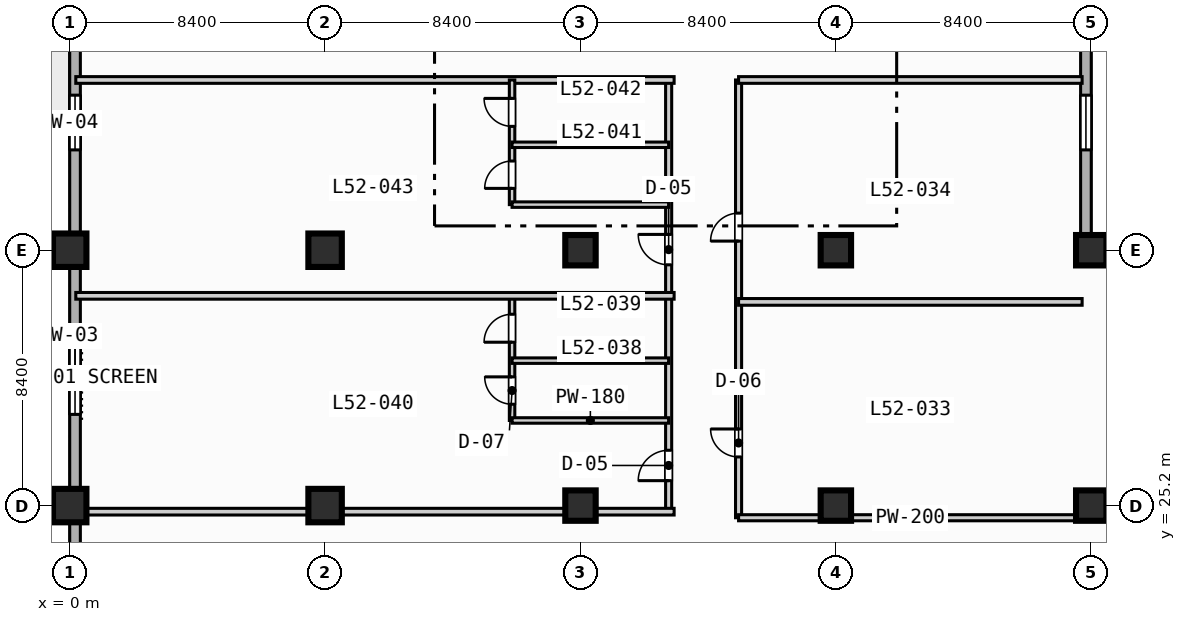
"""IFC4 building model, lengths in metres.
Left out: names, types, materials, properties, quantities, classifications, styles, units other than length and angle.
Written with IfcOpenShell. Run it as: python <this file> out.ifc"""

import sys

from ifc_helpers import new_model, si_unit, direction, frame, frame_2d, origin, origin_2d, place, context, subcontext, project, spatial, rectangle, extrude, element, fill, save


model = new_model("IFC4")
c1 = context("Model", 3, precision=1e-05, world=origin(), true_north=direction((0.0, 1.0)))
c2 = subcontext(c1, "Body", "Model", "MODEL_VIEW")
j1 = project(units=[si_unit("LENGTHUNIT", "METRE"), si_unit("PLANEANGLEUNIT", "RADIAN")], contexts=[c1])
p1 = place(None, origin())
s1 = spatial("IfcSite", under=j1, at=p1, CompositionType="ELEMENT")
p2 = place(p1, origin())
s2 = spatial("IfcBuilding", under=s1, at=p2, CompositionType="ELEMENT")
p3 = place(p2, frame((0.0, 0.0, 212.4)))
s3 = spatial("IfcBuildingStorey", under=s2, at=p3, CompositionType="ELEMENT", Elevation=212.4)
for number, where, z_axis, x_axis in (
    (1, (0.0, 25.2, 0.0), (0.0, 0.0, 1.0), (1.0, 0.0, 0.0)),
    (2, (0.0, 33.6, 0.0), (0.0, 0.0, 1.0), (1.0, 0.0, 0.0)),
    (3, (8.4, 25.2, 0.0), (0.0, 0.0, 1.0), (1.0, 0.0, 0.0)),
    (4, (8.4, 33.6, 0.0), (0.0, 0.0, 1.0), (1.0, 0.0, 0.0)),
):
    element("IfcColumn", number, at=place(p3, frame(where, z_axis=z_axis, x_axis=x_axis)), inside=s3, PredefinedType="COLUMN", context=c2, shape_type="SweptSolid", body=[
        extrude(rectangle(XDim=1.1, YDim=1.1, at=origin_2d()), origin(), (0.0, 0.0, 1.0), 3.7),
    ])
for number, where, z_axis, x_axis in (
    (5, (16.8, 25.2, 0.0), (0.0, 0.0, 1.0), (1.0, 0.0, 0.0)),
    (6, (16.8, 33.6, 0.0), (0.0, 0.0, 1.0), (1.0, 0.0, 0.0)),
    (7, (25.2, 25.2, 0.0), (0.0, 0.0, 1.0), (1.0, 0.0, 0.0)),
    (8, (25.2, 33.6, 0.0), (0.0, 0.0, 1.0), (1.0, 0.0, 0.0)),
    (9, (33.6, 25.2, 0.0), (0.0, 0.0, 1.0), (1.0, 0.0, 0.0)),
    (10, (33.6, 33.6, 0.0), (0.0, 0.0, 1.0), (1.0, 0.0, 0.0)),
):
    element("IfcColumn", number, at=place(p3, frame(where, z_axis=z_axis, x_axis=x_axis)), inside=s3, PredefinedType="COLUMN", context=c2, shape_type="SweptSolid", body=[
        extrude(rectangle(XDim=1.0, YDim=1.0, at=origin_2d()), origin(), (0.0, 0.0, 1.0), 3.7),
    ])
p4 = place(p3, frame((0.175, 3.175, 0.0), z_axis=(0.0, 0.0, 1.0), x_axis=(0.0, 1.0, 0.0)))
e11 = element("IfcWall", 11, at=p4, inside=s3, PredefinedType="STANDARD", context=c2, shape_type="SweptSolid", body=[
    extrude(rectangle(XDim=69.25, YDim=0.35, at=frame_2d((34.625, 0.0))), origin(), (0.0, 0.0, 1.0), 3.47),
])
p5 = place(p4, frame((42.325, 0.0, 0.0)))
e12 = element("IfcOpeningElement", 12, at=p5, cuts=e11, PredefinedType="OPENING", context=c2, shape_type="SweptSolid", body=[
    extrude(rectangle(XDim=1.4, YDim=2.2, at=frame_2d((0.7, 1.1))), frame((0.0, 0.185, 0.0), z_axis=(0.0, -1.0, 0.0), x_axis=(1.0, 0.0, 0.0)), (0.0, 0.0, 1.0), 0.37),
])
p6 = place(p4, frame((25.025, 0.0, 0.85)))
e13 = element("IfcOpeningElement", 13, at=p6, cuts=e11, PredefinedType="OPENING", context=c2, shape_type="SweptSolid", body=[
    extrude(rectangle(XDim=2.4, YDim=1.95, at=frame_2d((1.2, 0.975))), frame((0.0, 0.185, 0.0), z_axis=(0.0, -1.0, 0.0), x_axis=(1.0, 0.0, 0.0)), (0.0, 0.0, 1.0), 0.37),
])
p7 = place(p4, frame((33.725, 0.0, 0.85)))
e14 = element("IfcOpeningElement", 14, at=p7, cuts=e11, PredefinedType="OPENING", context=c2, shape_type="SweptSolid", body=[
    extrude(rectangle(XDim=1.8, YDim=1.8, at=frame_2d((0.9, 0.9))), frame((0.0, 0.185, 0.0), z_axis=(0.0, -1.0, 0.0), x_axis=(1.0, 0.0, 0.0)), (0.0, 0.0, 1.0), 0.37),
])
p8 = place(p4, frame((58.375, 0.0, 0.85)))
e15 = element("IfcOpeningElement", 15, at=p8, cuts=e11, PredefinedType="OPENING", context=c2, shape_type="SweptSolid", body=[
    extrude(rectangle(XDim=1.8, YDim=1.8, at=frame_2d((0.9, 0.9))), frame((0.0, 0.185, 0.0), z_axis=(0.0, -1.0, 0.0), x_axis=(1.0, 0.0, 0.0)), (0.0, 0.0, 1.0), 0.37),
])
p9 = place(p4, frame((64.775, 0.0, 0.85)))
e16 = element("IfcOpeningElement", 16, at=p9, cuts=e11, PredefinedType="OPENING", context=c2, shape_type="SweptSolid", body=[
    extrude(rectangle(XDim=1.8, YDim=1.8, at=frame_2d((0.9, 0.9))), frame((0.0, 0.185, 0.0), z_axis=(0.0, -1.0, 0.0), x_axis=(1.0, 0.0, 0.0)), (0.0, 0.0, 1.0), 0.37),
])
p10 = place(p3, frame((33.425, 72.425, 0.0), z_axis=(0.0, 0.0, 1.0), x_axis=(0.0, -1.0, 0.0)))
e17 = element("IfcWall", 17, at=p10, inside=s3, PredefinedType="STANDARD", context=c2, shape_type="SweptSolid", body=[
    extrude(rectangle(XDim=39.0, YDim=0.35, at=frame_2d((19.5, 0.0))), origin(), (0.0, 0.0, 1.0), 3.47),
])
p11 = place(p10, frame((33.725, 0.0, 0.85)))
e18 = element("IfcOpeningElement", 18, at=p11, cuts=e17, PredefinedType="OPENING", context=c2, shape_type="SweptSolid", body=[
    extrude(rectangle(XDim=1.8, YDim=1.8, at=frame_2d((0.9, 0.9))), frame((0.0, 0.185, 0.0), z_axis=(0.0, -1.0, 0.0), x_axis=(1.0, 0.0, 0.0)), (0.0, 0.0, 1.0), 0.37),
])
p12 = place(p10, frame((16.925, 0.0, 0.85)))
e19 = element("IfcOpeningElement", 19, at=p12, cuts=e17, PredefinedType="OPENING", context=c2, shape_type="SweptSolid", body=[
    extrude(rectangle(XDim=1.8, YDim=1.8, at=frame_2d((0.9, 0.9))), frame((0.0, 0.185, 0.0), z_axis=(0.0, -1.0, 0.0), x_axis=(1.0, 0.0, 0.0)), (0.0, 0.0, 1.0), 0.37),
])
p13 = place(p10, frame((8.225, 0.0, 0.85)))
e20 = element("IfcOpeningElement", 20, at=p13, cuts=e17, PredefinedType="OPENING", context=c2, shape_type="SweptSolid", body=[
    extrude(rectangle(XDim=2.4, YDim=1.95, at=frame_2d((1.2, 0.975))), frame((0.0, 0.185, 0.0), z_axis=(0.0, -1.0, 0.0), x_axis=(1.0, 0.0, 0.0)), (0.0, 0.0, 1.0), 0.37),
])
p14 = place(p3, frame((33.425, 33.425, 0.0), z_axis=(0.0, 0.0, 1.0), x_axis=(1.0, 0.0, 0.0)))
e21 = element("IfcWall", 21, at=p14, inside=s3, PredefinedType="STANDARD", context=c2, shape_type="SweptSolid", body=[
    extrude(rectangle(XDim=39.0, YDim=0.35, at=frame_2d((19.5, 0.0))), origin(), (0.0, 0.0, 1.0), 3.47),
])
p15 = place(p14, frame((12.075, 0.0, 0.0)))
e22 = element("IfcOpeningElement", 22, at=p15, cuts=e21, PredefinedType="OPENING", context=c2, shape_type="SweptSolid", body=[
    extrude(rectangle(XDim=1.4, YDim=2.2, at=frame_2d((0.7, 1.1))), frame((0.0, 0.185, 0.0), z_axis=(0.0, -1.0, 0.0), x_axis=(1.0, 0.0, 0.0)), (0.0, 0.0, 1.0), 0.37),
])
p16 = place(p14, frame((20.275, 0.0, 0.85)))
e23 = element("IfcOpeningElement", 23, at=p16, cuts=e21, PredefinedType="OPENING", context=c2, shape_type="SweptSolid", body=[
    extrude(rectangle(XDim=1.8, YDim=1.8, at=frame_2d((0.9, 0.9))), frame((0.0, 0.185, 0.0), z_axis=(0.0, -1.0, 0.0), x_axis=(1.0, 0.0, 0.0)), (0.0, 0.0, 1.0), 0.37),
])
p17 = place(p14, frame((28.375, 0.0, 0.85)))
e24 = element("IfcOpeningElement", 24, at=p17, cuts=e21, PredefinedType="OPENING", context=c2, shape_type="SweptSolid", body=[
    extrude(rectangle(XDim=2.4, YDim=1.95, at=frame_2d((1.2, 0.975))), frame((0.0, 0.185, 0.0), z_axis=(0.0, -1.0, 0.0), x_axis=(1.0, 0.0, 0.0)), (0.0, 0.0, 1.0), 0.37),
])
p18 = place(p3, frame((22.0, 24.8, 0.0), z_axis=(0.0, 0.0, 1.0), x_axis=(0.0, 1.0, 0.0)))
e25 = element("IfcWall", 25, at=p18, inside=s3, PredefinedType="PARTITIONING", context=c2, shape_type="SweptSolid", body=[
    extrude(rectangle(XDim=14.4, YDim=0.2, at=frame_2d((7.2, 0.0))), origin(), (0.0, 0.0, 1.0), 3.47),
])
p19 = place(p18, frame((2.0, 0.0, 0.0)))
e26 = element("IfcOpeningElement", 26, at=p19, cuts=e25, PredefinedType="OPENING", context=c2, shape_type="SweptSolid", body=[
    extrude(rectangle(XDim=0.92, YDim=2.1, at=frame_2d((0.46, 1.05))), frame((0.0, 0.11, 0.0), z_axis=(0.0, -1.0, 0.0), x_axis=(1.0, 0.0, 0.0)), (0.0, 0.0, 1.0), 0.22),
])
p20 = place(p18, frame((9.1, 0.0, 0.0)))
e27 = element("IfcOpeningElement", 27, at=p20, cuts=e25, PredefinedType="OPENING", context=c2, shape_type="SweptSolid", body=[
    extrude(rectangle(XDim=0.92, YDim=2.1, at=frame_2d((0.46, 1.05))), frame((0.0, 0.11, 0.0), z_axis=(0.0, -1.0, 0.0), x_axis=(1.0, 0.0, 0.0)), (0.0, 0.0, 1.0), 0.22),
])
p21 = place(p3, frame((22.0, 24.8, 0.0), z_axis=(0.0, 0.0, 1.0), x_axis=(1.0, 0.0, 0.0)))
e28 = element("IfcWall", 28, at=p21, inside=s3, PredefinedType="PARTITIONING", context=c2, shape_type="SweptSolid", body=[
    extrude(rectangle(XDim=11.3, YDim=0.2, at=frame_2d((5.65, 0.0))), origin(), (0.0, 0.0, 1.0), 3.47),
])
for number, where, z_axis, x_axis in (
    (29, (22.0, 31.9, 0.0), (0.0, 0.0, 1.0), (1.0, 0.0, 0.0)),
    (30, (22.0, 39.2, 0.0), (0.0, 0.0, 1.0), (1.0, 0.0, 0.0)),
):
    element("IfcWall", number, at=place(p3, frame(where, z_axis=z_axis, x_axis=x_axis)), inside=s3, PredefinedType="PARTITIONING", context=c2, shape_type="SweptSolid", body=[
        extrude(rectangle(XDim=11.3, YDim=0.22, at=frame_2d((5.65, 0.0))), origin(), (0.0, 0.0, 1.0), 3.47),
    ])
p22 = place(p3, frame((19.7, 25.0, 0.0), z_axis=(0.0, 0.0, 1.0), x_axis=(0.0, 1.0, 0.0)))
e31 = element("IfcWall", 31, at=p22, inside=s3, PredefinedType="PARTITIONING", context=c2, shape_type="SweptSolid", body=[
    extrude(rectangle(XDim=14.2, YDim=0.2, at=frame_2d((7.1, 0.0))), origin(), (0.0, 0.0, 1.0), 3.47),
])
p23 = place(p22, frame((1.02, 0.0, 0.0)))
e32 = element("IfcOpeningElement", 32, at=p23, cuts=e31, PredefinedType="OPENING", context=c2, shape_type="SweptSolid", body=[
    extrude(rectangle(XDim=1.0, YDim=2.15, at=frame_2d((0.5, 1.075))), frame((0.0, 0.11, 0.0), z_axis=(0.0, -1.0, 0.0), x_axis=(1.0, 0.0, 0.0)), (0.0, 0.0, 1.0), 0.22),
])
p24 = place(p22, frame((8.12, 0.0, 0.0)))
e33 = element("IfcOpeningElement", 33, at=p24, cuts=e31, PredefinedType="OPENING", context=c2, shape_type="SweptSolid", body=[
    extrude(rectangle(XDim=1.0, YDim=2.15, at=frame_2d((0.5, 1.075))), frame((0.0, 0.11, 0.0), z_axis=(0.0, -1.0, 0.0), x_axis=(1.0, 0.0, 0.0)), (0.0, 0.0, 1.0), 0.22),
])
p25 = place(p3, frame((0.2, 25.0, 0.0), z_axis=(0.0, 0.0, 1.0), x_axis=(1.0, 0.0, 0.0)))
e34 = element("IfcWall", 34, at=p25, inside=s3, PredefinedType="PARTITIONING", context=c2, shape_type="SweptSolid", body=[
    extrude(rectangle(XDim=19.68, YDim=0.22, at=frame_2d((9.84, 0.0))), origin(), (0.0, 0.0, 1.0), 2.82),
])
p26 = place(p3, frame((14.55, 28.0, 0.0), z_axis=(0.0, 0.0, 1.0), x_axis=(0.0, 1.0, 0.0)))
e35 = element("IfcWall", 35, at=p26, inside=s3, PredefinedType="PLUMBINGWALL", context=c2, shape_type="SweptSolid", body=[
    extrude(rectangle(XDim=4.1, YDim=0.18, at=frame_2d((2.05, 0.0))), origin(), (0.0, 0.0, 1.0), 3.47),
])
p27 = place(p26, frame((0.534, 0.0, 0.0)))
e36 = element("IfcOpeningElement", 36, at=p27, cuts=e35, PredefinedType="OPENING", context=c2, shape_type="SweptSolid", body=[
    extrude(rectangle(XDim=0.9, YDim=2.1, at=frame_2d((0.45, 1.05))), frame((0.0, 0.1, 0.0), z_axis=(0.0, -1.0, 0.0), x_axis=(1.0, 0.0, 0.0)), (0.0, 0.0, 1.0), 0.2),
])
p28 = place(p26, frame((2.574, 0.0, 0.0)))
e37 = element("IfcOpeningElement", 37, at=p28, cuts=e35, PredefinedType="OPENING", context=c2, shape_type="SweptSolid", body=[
    extrude(rectangle(XDim=0.92, YDim=2.1, at=frame_2d((0.46, 1.05))), frame((0.0, 0.1, 0.0), z_axis=(0.0, -1.0, 0.0), x_axis=(1.0, 0.0, 0.0)), (0.0, 0.0, 1.0), 0.2),
])
for number, where, z_axis, x_axis in (
    (38, (14.55, 28.0, 0.0), (0.0, 0.0, 1.0), (1.0, 0.0, 0.0)),
    (39, (14.55, 29.968, 0.0), (0.0, 0.0, 1.0), (1.0, 0.0, 0.0)),
):
    element("IfcWall", number, at=place(p3, frame(where, z_axis=z_axis, x_axis=x_axis)), inside=s3, PredefinedType="PLUMBINGWALL", context=c2, shape_type="SweptSolid", body=[
        extrude(rectangle(XDim=5.15, YDim=0.18, at=frame_2d((2.575, 0.0))), origin(), (0.0, 0.0, 1.0), 3.47),
    ])
for number, where, z_axis, x_axis in (
    (40, (0.2, 32.1, 0.0), (0.0, 0.0, 1.0), (1.0, 0.0, 0.0)),
    (41, (0.2, 39.2, 0.0), (0.0, 0.0, 1.0), (1.0, 0.0, 0.0)),
):
    element("IfcWall", number, at=place(p3, frame(where, z_axis=z_axis, x_axis=x_axis)), inside=s3, PredefinedType="PARTITIONING", context=c2, shape_type="SweptSolid", body=[
        extrude(rectangle(XDim=19.68, YDim=0.22, at=frame_2d((9.84, 0.0))), origin(), (0.0, 0.0, 1.0), 3.47),
    ])
p29 = place(p3, frame((14.55, 35.1, 0.0), z_axis=(0.0, 0.0, 1.0), x_axis=(0.0, 1.0, 0.0)))
e42 = element("IfcWall", 42, at=p29, inside=s3, PredefinedType="PLUMBINGWALL", context=c2, shape_type="SweptSolid", body=[
    extrude(rectangle(XDim=4.1, YDim=0.18, at=frame_2d((2.05, 0.0))), origin(), (0.0, 0.0, 1.0), 3.47),
])
p30 = place(p29, frame((0.534, 0.0, 0.0)))
e43 = element("IfcOpeningElement", 43, at=p30, cuts=e42, PredefinedType="OPENING", context=c2, shape_type="SweptSolid", body=[
    extrude(rectangle(XDim=0.9, YDim=2.1, at=frame_2d((0.45, 1.05))), frame((0.0, 0.1, 0.0), z_axis=(0.0, -1.0, 0.0), x_axis=(1.0, 0.0, 0.0)), (0.0, 0.0, 1.0), 0.2),
])
p31 = place(p29, frame((2.574, 0.0, 0.0)))
e44 = element("IfcOpeningElement", 44, at=p31, cuts=e42, PredefinedType="OPENING", context=c2, shape_type="SweptSolid", body=[
    extrude(rectangle(XDim=0.92, YDim=2.1, at=frame_2d((0.46, 1.05))), frame((0.0, 0.1, 0.0), z_axis=(0.0, -1.0, 0.0), x_axis=(1.0, 0.0, 0.0)), (0.0, 0.0, 1.0), 0.2),
])
for number, where, z_axis, x_axis in (
    (45, (14.55, 35.1, 0.0), (0.0, 0.0, 1.0), (1.0, 0.0, 0.0)),
    (46, (14.55, 37.068, 0.0), (0.0, 0.0, 1.0), (1.0, 0.0, 0.0)),
):
    element("IfcWall", number, at=place(p3, frame(where, z_axis=z_axis, x_axis=x_axis)), inside=s3, PredefinedType="PLUMBINGWALL", context=c2, shape_type="SweptSolid", body=[
        extrude(rectangle(XDim=5.15, YDim=0.18, at=frame_2d((2.575, 0.0))), origin(), (0.0, 0.0, 1.0), 3.47),
    ])
p32 = place(p6, origin())
e47 = element("IfcWindow", 47, at=p32, inside=s3, PartitioningType="SINGLE_PANEL", PredefinedType="WINDOW", context=c2, shape_type="SweptSolid", body=[
    extrude(rectangle(XDim=2.4, YDim=1.95, at=frame_2d((1.2, 0.975))), frame((0.0, 0.03, 0.0), z_axis=(0.0, -1.0, 0.0), x_axis=(1.0, 0.0, 0.0)), (0.0, 0.0, 1.0), 0.06),
])
fill(e13, e47)
p33 = place(p7, origin())
e48 = element("IfcWindow", 48, at=p33, inside=s3, PartitioningType="SINGLE_PANEL", PredefinedType="WINDOW", context=c2, shape_type="SweptSolid", body=[
    extrude(rectangle(XDim=1.8, YDim=1.8, at=frame_2d((0.9, 0.9))), frame((0.0, 0.03, 0.0), z_axis=(0.0, -1.0, 0.0), x_axis=(1.0, 0.0, 0.0)), (0.0, 0.0, 1.0), 0.06),
])
fill(e14, e48)
p34 = place(p11, origin())
e49 = element("IfcWindow", 49, at=p34, inside=s3, PartitioningType="SINGLE_PANEL", PredefinedType="WINDOW", context=c2, shape_type="SweptSolid", body=[
    extrude(rectangle(XDim=1.8, YDim=1.8, at=frame_2d((0.9, 0.9))), frame((0.0, 0.03, 0.0), z_axis=(0.0, -1.0, 0.0), x_axis=(1.0, 0.0, 0.0)), (0.0, 0.0, 1.0), 0.06),
])
fill(e18, e49)
p35 = place(p19, origin())
e50 = element("IfcDoor", 50, at=p35, inside=s3, OperationType="SINGLE_SWING_RIGHT", PredefinedType="DOOR", context=c2, shape_type="SweptSolid", body=[
    extrude(rectangle(XDim=0.92, YDim=2.1, at=frame_2d((0.46, 1.05))), frame((0.0, 0.025, 0.0), z_axis=(0.0, -1.0, 0.0), x_axis=(1.0, 0.0, 0.0)), (0.0, 0.0, 1.0), 0.05),
])
fill(e26, e50)
p36 = place(p20, origin())
e51 = element("IfcDoor", 51, at=p36, inside=s3, OperationType="SINGLE_SWING_LEFT", PredefinedType="DOOR", context=c2, shape_type="SweptSolid", body=[
    extrude(rectangle(XDim=0.92, YDim=2.1, at=frame_2d((0.46, 1.05))), frame((0.0, 0.025, 0.0), z_axis=(0.0, -1.0, 0.0), x_axis=(1.0, 0.0, 0.0)), (0.0, 0.0, 1.0), 0.05),
])
fill(e27, e51)
p37 = place(p23, origin())
e52 = element("IfcDoor", 52, at=p37, inside=s3, OperationType="SINGLE_SWING_LEFT", PredefinedType="DOOR", context=c2, shape_type="SweptSolid", body=[
    extrude(rectangle(XDim=1.0, YDim=2.15, at=frame_2d((0.5, 1.075))), frame((0.0, 0.025, 0.0), z_axis=(0.0, -1.0, 0.0), x_axis=(1.0, 0.0, 0.0)), (0.0, 0.0, 1.0), 0.05),
])
fill(e32, e52)
p38 = place(p24, origin())
e53 = element("IfcDoor", 53, at=p38, inside=s3, OperationType="SINGLE_SWING_RIGHT", PredefinedType="DOOR", context=c2, shape_type="SweptSolid", body=[
    extrude(rectangle(XDim=1.0, YDim=2.15, at=frame_2d((0.5, 1.075))), frame((0.0, 0.025, 0.0), z_axis=(0.0, -1.0, 0.0), x_axis=(1.0, 0.0, 0.0)), (0.0, 0.0, 1.0), 0.05),
])
fill(e33, e53)
p39 = place(p27, origin())
e54 = element("IfcDoor", 54, at=p39, inside=s3, OperationType="SINGLE_SWING_RIGHT", PredefinedType="DOOR", context=c2, shape_type="SweptSolid", body=[
    extrude(rectangle(XDim=0.9, YDim=2.1, at=frame_2d((0.45, 1.05))), frame((0.0, 0.025, 0.0), z_axis=(0.0, -1.0, 0.0), x_axis=(1.0, 0.0, 0.0)), (0.0, 0.0, 1.0), 0.05),
])
fill(e36, e54)
p40 = place(p28, origin())
e55 = element("IfcDoor", 55, at=p40, inside=s3, OperationType="SINGLE_SWING_LEFT", PredefinedType="DOOR", context=c2, shape_type="SweptSolid", body=[
    extrude(rectangle(XDim=0.92, YDim=2.1, at=frame_2d((0.46, 1.05))), frame((0.0, 0.025, 0.0), z_axis=(0.0, -1.0, 0.0), x_axis=(1.0, 0.0, 0.0)), (0.0, 0.0, 1.0), 0.05),
])
fill(e37, e55)
p41 = place(p30, origin())
e56 = element("IfcDoor", 56, at=p41, inside=s3, OperationType="SINGLE_SWING_LEFT", PredefinedType="DOOR", context=c2, shape_type="SweptSolid", body=[
    extrude(rectangle(XDim=0.9, YDim=2.1, at=frame_2d((0.45, 1.05))), frame((0.0, 0.025, 0.0), z_axis=(0.0, -1.0, 0.0), x_axis=(1.0, 0.0, 0.0)), (0.0, 0.0, 1.0), 0.05),
])
fill(e43, e56)
p42 = place(p31, origin())
e57 = element("IfcDoor", 57, at=p42, inside=s3, OperationType="SINGLE_SWING_RIGHT", PredefinedType="DOOR", context=c2, shape_type="SweptSolid", body=[
    extrude(rectangle(XDim=0.92, YDim=2.1, at=frame_2d((0.46, 1.05))), frame((0.0, 0.025, 0.0), z_axis=(0.0, -1.0, 0.0), x_axis=(1.0, 0.0, 0.0)), (0.0, 0.0, 1.0), 0.05),
])
fill(e44, e57)
save(model, sys.argv[1])
